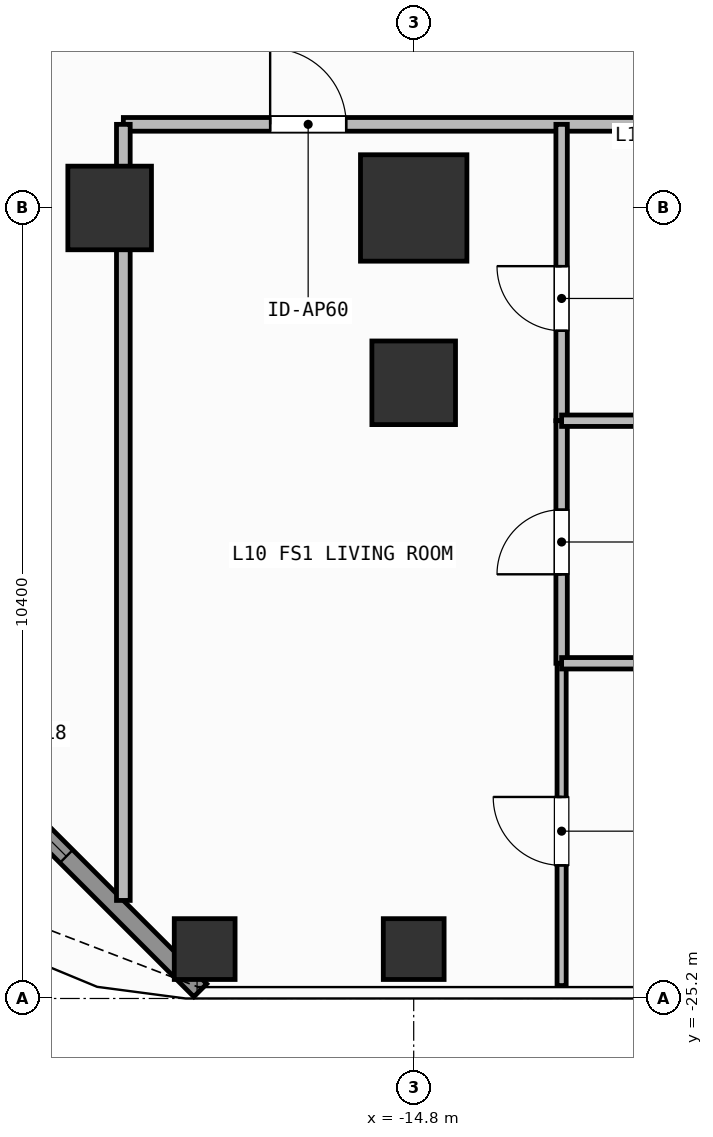
"""IFC4 building model, lengths in metres.
Left out: names, types, materials, properties, quantities, classifications, styles, units other than length and angle.
Written with IfcOpenShell. Run it as: python <this file> out.ifc"""

import sys

from ifc_helpers import new_model, si_unit, direction, frame, frame_2d, origin, origin_2d, place, context, subcontext, project, spatial, rectangle, hollow_rectangle, extrude, element, fill, save


model = new_model("IFC4")
c1 = context("Model", 3, precision=1e-05, world=origin(), true_north=direction((0.0, 1.0)))
c2 = subcontext(c1, "Body", "Model", "MODEL_VIEW")
j1 = project(units=[si_unit("LENGTHUNIT", "METRE"), si_unit("PLANEANGLEUNIT", "RADIAN")], contexts=[c1])
p1 = place(None, origin())
s1 = spatial("IfcSite", under=j1, at=p1, CompositionType="ELEMENT")
p2 = place(p1, origin())
s2 = spatial("IfcBuilding", under=s1, at=p2, CompositionType="ELEMENT")
p3 = place(p2, frame((0.0, 0.0, 38.4)))
s3 = spatial("IfcBuildingStorey", under=s2, at=p3, CompositionType="ELEMENT", Elevation=38.4)
p4 = place(p3, frame((-14.8, -14.8, 0.0), z_axis=(0.0, 0.0, 1.0), x_axis=(1.0, 0.0, 0.0)))
e1 = element("IfcColumn", 1, at=p4, inside=s3, PredefinedType="COLUMN", context=c2, shape_type="SweptSolid", body=[
    extrude(rectangle(XDim=1.4, YDim=1.4, at=origin_2d()), origin(), (0.0, 0.0, 1.0), 3.9),
])
for number, where, z_axis, x_axis in (
    (2, (-18.8, -14.8, 0.0), (0.0, 0.0, 1.0), (1.0, 0.0, 0.0)),
    (3, (-14.8, -17.1, 0.0), (0.0, 0.0, 1.0), (1.0, 0.0, 0.0)),
):
    element("IfcColumn", number, at=place(p3, frame(where, z_axis=z_axis, x_axis=x_axis)), inside=s3, PredefinedType="COLUMN", context=c2, shape_type="SweptSolid", body=[
        extrude(rectangle(XDim=1.1, YDim=1.1, at=origin_2d()), origin(), (0.0, 0.0, 1.0), 3.9),
    ])
for number, where, z_axis, x_axis in (
    (4, (-17.55, -24.55, 0.0), (0.0, 0.0, 1.0), (1.0, 0.0, 0.0)),
    (5, (-14.8, -24.55, 0.0), (0.0, 0.0, 1.0), (1.0, 0.0, 0.0)),
):
    element("IfcColumn", number, at=place(p3, frame(where, z_axis=z_axis, x_axis=x_axis)), inside=s3, PredefinedType="COLUMN", context=c2, shape_type="SweptSolid", body=[
        extrude(hollow_rectangle(XDim=0.8, YDim=0.8, WallThickness=0.036, at=origin_2d()), origin(), (0.0, 0.0, 1.0), 3.9),
    ])
p5 = place(p3, frame((-17.608, -25.092, 0.0), z_axis=(0.0, 0.0, 1.0), x_axis=(-0.707106781187, 0.707106781187, 0.0)))
e6 = element("IfcWall", 6, at=p5, inside=s3, PredefinedType="SOLIDWALL", context=c2, shape_type="SweptSolid", body=[
    extrude(rectangle(XDim=6.484, YDim=0.24, at=frame_2d((3.242, 0.0))), origin(), (0.0, 0.0, 1.0), 3.68),
])
p6 = place(p5, frame((2.492, 0.0, 0.8)))
e7 = element("IfcOpeningElement", 7, at=p6, cuts=e6, PredefinedType="OPENING", context=c2, shape_type="SweptSolid", body=[
    extrude(rectangle(XDim=1.5, YDim=1.85, at=frame_2d((0.75, 0.925))), frame((0.0, 0.13, 0.0), z_axis=(0.0, -1.0, 0.0), x_axis=(1.0, 0.0, 0.0)), (0.0, 0.0, 1.0), 0.26),
])
p7 = place(p3, frame((-18.62, -13.7, 0.0), z_axis=(0.0, 0.0, 1.0), x_axis=(1.0, 0.0, 0.0)))
e8 = element("IfcWall", 8, at=p7, inside=s3, PredefinedType="PARTITIONING", context=c2, shape_type="SweptSolid", body=[
    extrude(rectangle(XDim=9.469, YDim=0.18, at=frame_2d((4.735, 0.0))), origin(), (0.0, 0.0, 1.0), 3.68),
])
p8 = place(p7, frame((1.931, 0.0, 0.0)))
e9 = element("IfcOpeningElement", 9, at=p8, cuts=e8, PredefinedType="OPENING", context=c2, shape_type="SweptSolid", body=[
    extrude(rectangle(XDim=1.0, YDim=2.2, at=frame_2d((0.5, 1.1))), frame((0.0, 0.1, 0.0), z_axis=(0.0, -1.0, 0.0), x_axis=(1.0, 0.0, 0.0)), (0.0, 0.0, 1.0), 0.2),
])
p9 = place(p3, frame((-12.854, -17.599, 0.0), z_axis=(0.0, 0.0, 1.0), x_axis=(0.0, 1.0, 0.0)))
e10 = element("IfcWall", 10, at=p9, inside=s3, PredefinedType="PARTITIONING", context=c2, shape_type="SweptSolid", body=[
    extrude(rectangle(XDim=3.899, YDim=0.15, at=frame_2d((1.95, 0.0))), origin(), (0.0, 0.0, 1.0), 3.68),
])
p10 = place(p9, frame((1.183, 0.0, 0.0)))
e11 = element("IfcOpeningElement", 11, at=p10, cuts=e10, PredefinedType="OPENING", context=c2, shape_type="SweptSolid", body=[
    extrude(rectangle(XDim=0.85, YDim=2.1, at=frame_2d((0.425, 1.05))), frame((0.0, 0.085, 0.0), z_axis=(0.0, -1.0, 0.0), x_axis=(1.0, 0.0, 0.0)), (0.0, 0.0, 1.0), 0.17),
])
p11 = place(p3, frame((-12.854, -20.79, 0.0), z_axis=(0.0, 0.0, 1.0), x_axis=(0.0, 1.0, 0.0)))
e12 = element("IfcWall", 12, at=p11, inside=s3, PredefinedType="PARTITIONING", context=c2, shape_type="SweptSolid", body=[
    extrude(rectangle(XDim=3.191, YDim=0.15, at=frame_2d((1.595, 0.0))), origin(), (0.0, 0.0, 1.0), 3.68),
])
p12 = place(p11, frame((1.17, 0.0, 0.0)))
e13 = element("IfcOpeningElement", 13, at=p12, cuts=e12, PredefinedType="OPENING", context=c2, shape_type="SweptSolid", body=[
    extrude(rectangle(XDim=0.85, YDim=2.1, at=frame_2d((0.425, 1.05))), frame((0.0, 0.085, 0.0), z_axis=(0.0, -1.0, 0.0), x_axis=(1.0, 0.0, 0.0)), (0.0, 0.0, 1.0), 0.17),
])
p13 = place(p3, frame((-12.854, -25.03, 0.0), z_axis=(0.0, 0.0, 1.0), x_axis=(0.0, 1.0, 0.0)))
e14 = element("IfcWall", 14, at=p13, inside=s3, PredefinedType="PARTITIONING", context=c2, shape_type="SweptSolid", body=[
    extrude(rectangle(XDim=4.24, YDim=0.12, at=frame_2d((2.12, 0.0))), origin(), (0.0, 0.0, 1.0), 3.68),
])
p14 = place(p13, frame((1.581, 0.0, 0.0)))
e15 = element("IfcOpeningElement", 15, at=p14, cuts=e14, PredefinedType="OPENING", context=c2, shape_type="SweptSolid", body=[
    extrude(rectangle(XDim=0.9, YDim=2.1, at=frame_2d((0.45, 1.05))), frame((0.0, 0.07, 0.0), z_axis=(0.0, -1.0, 0.0), x_axis=(1.0, 0.0, 0.0)), (0.0, 0.0, 1.0), 0.14),
])
p15 = place(p3, frame((-18.62, -23.91, 0.0), z_axis=(0.0, 0.0, 1.0), x_axis=(0.0, 1.0, 0.0)))
e16 = element("IfcWall", 16, at=p15, inside=s3, PredefinedType="PARTITIONING", context=c2, shape_type="SweptSolid", body=[
    extrude(rectangle(XDim=10.21, YDim=0.18, at=frame_2d((5.105, 0.0))), origin(), (0.0, 0.0, 1.0), 3.082),
])
for number, where, z_axis, x_axis in (
    (17, (-12.854, -17.599, 0.0), (0.0, 0.0, 1.0), (1.0, 0.0, 0.0)),
    (18, (-12.854, -20.79, 0.0), (0.0, 0.0, 1.0), (1.0, 0.0, 0.0)),
):
    element("IfcWall", number, at=place(p3, frame(where, z_axis=z_axis, x_axis=x_axis)), inside=s3, PredefinedType="PARTITIONING", context=c2, shape_type="SweptSolid", body=[
        extrude(rectangle(XDim=3.703, YDim=0.15, at=frame_2d((1.852, 0.0))), origin(), (0.0, 0.0, 1.0), 3.68),
    ])
p16 = place(p6, origin())
e19 = element("IfcWindow", 19, at=p16, inside=s3, PartitioningType="SINGLE_PANEL", PredefinedType="WINDOW", context=c2, shape_type="SweptSolid", body=[
    extrude(rectangle(XDim=1.5, YDim=1.85, at=frame_2d((0.75, 0.925))), frame((0.0, 0.03, 0.0), z_axis=(0.0, -1.0, 0.0), x_axis=(1.0, 0.0, 0.0)), (0.0, 0.0, 1.0), 0.06),
])
fill(e7, e19)
p17 = place(p8, origin())
e20 = element("IfcDoor", 20, at=p17, inside=s3, OperationType="SINGLE_SWING_LEFT", PredefinedType="DOOR", context=c2, shape_type="SweptSolid", body=[
    extrude(rectangle(XDim=1.0, YDim=2.2, at=frame_2d((0.5, 1.1))), frame((0.0, 0.025, 0.0), z_axis=(0.0, -1.0, 0.0), x_axis=(1.0, 0.0, 0.0)), (0.0, 0.0, 1.0), 0.05),
])
fill(e9, e20)
p18 = place(p10, origin())
e21 = element("IfcDoor", 21, at=p18, inside=s3, OperationType="SINGLE_SWING_RIGHT", PredefinedType="DOOR", context=c2, shape_type="SweptSolid", body=[
    extrude(rectangle(XDim=0.85, YDim=2.1, at=frame_2d((0.425, 1.05))), frame((0.0, 0.025, 0.0), z_axis=(0.0, -1.0, 0.0), x_axis=(1.0, 0.0, 0.0)), (0.0, 0.0, 1.0), 0.05),
])
fill(e11, e21)
p19 = place(p12, origin())
e22 = element("IfcDoor", 22, at=p19, inside=s3, OperationType="SINGLE_SWING_LEFT", PredefinedType="DOOR", context=c2, shape_type="SweptSolid", body=[
    extrude(rectangle(XDim=0.85, YDim=2.1, at=frame_2d((0.425, 1.05))), frame((0.0, 0.025, 0.0), z_axis=(0.0, -1.0, 0.0), x_axis=(1.0, 0.0, 0.0)), (0.0, 0.0, 1.0), 0.05),
])
fill(e13, e22)
p20 = place(p14, origin())
e23 = element("IfcDoor", 23, at=p20, inside=s3, OperationType="SINGLE_SWING_RIGHT", PredefinedType="DOOR", context=c2, shape_type="SweptSolid", body=[
    extrude(rectangle(XDim=0.9, YDim=2.1, at=frame_2d((0.45, 1.05))), frame((0.0, 0.025, 0.0), z_axis=(0.0, -1.0, 0.0), x_axis=(1.0, 0.0, 0.0)), (0.0, 0.0, 1.0), 0.05),
])
fill(e15, e23)
save(model, sys.argv[1])
